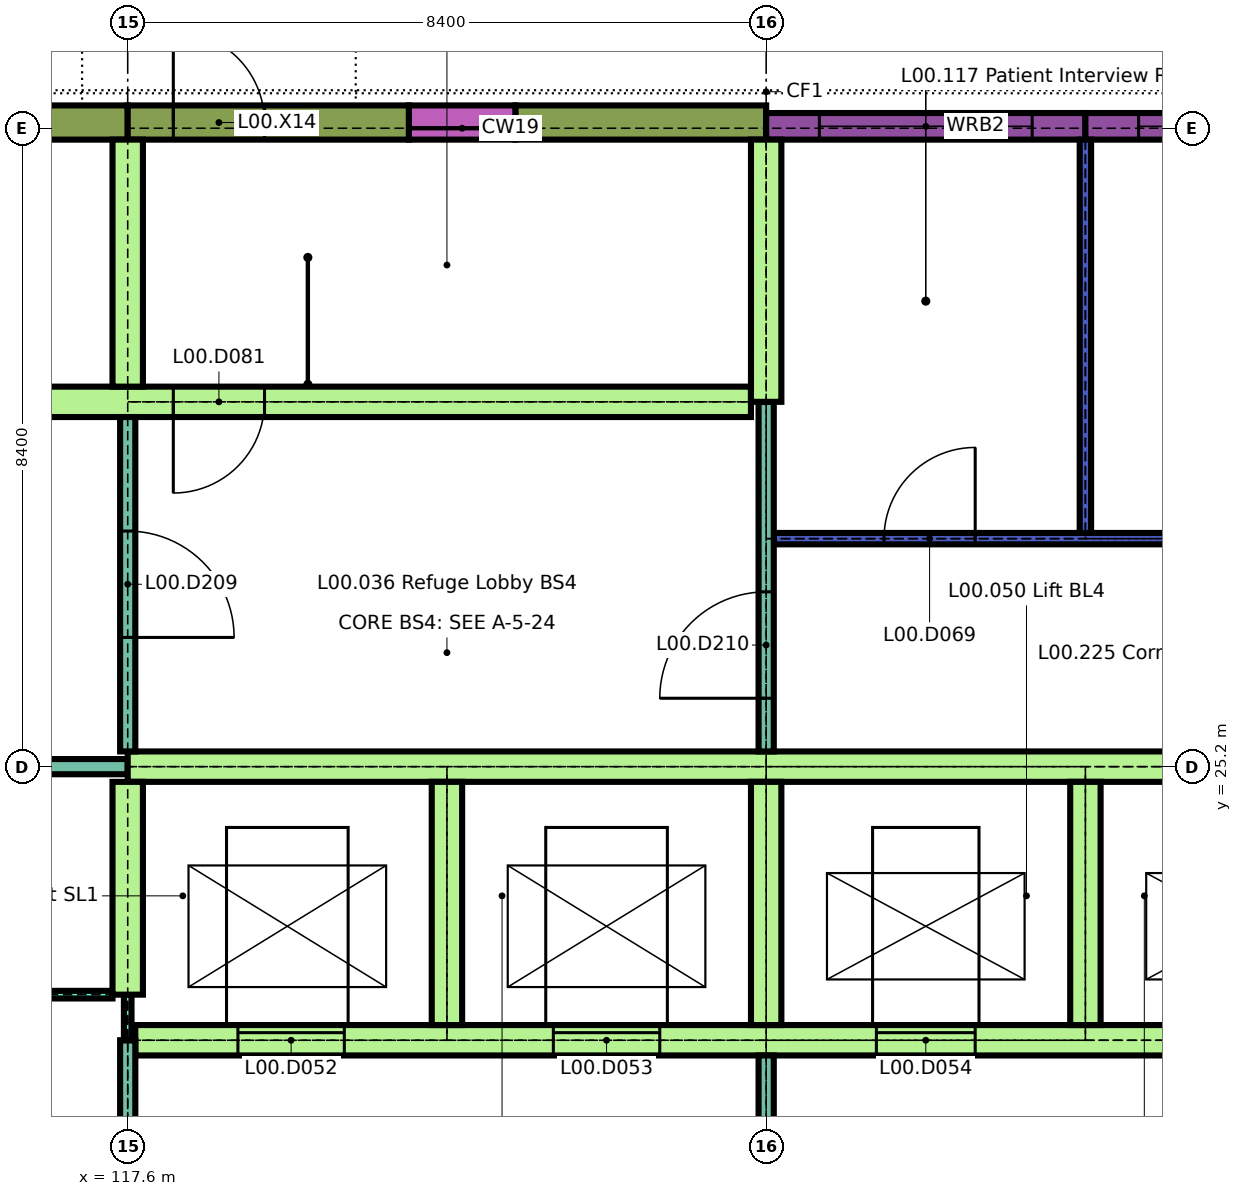
"""IFC4 building model, lengths in metres.
Left out: names, types, materials, properties, quantities, classifications, styles, units other than length and angle.
Written with IfcOpenShell. Run it as: python <this file> out.ifc"""

import sys

from ifc_helpers import new_model, si_unit, direction, frame, frame_2d, origin, place, context, subcontext, project, spatial, rectangle, extrude, element, fill, save


model = new_model("IFC4")
c1 = context("Model", 3, precision=1e-05, world=origin(), true_north=direction((0.0, 1.0)))
c2 = subcontext(c1, "Body", "Model", "MODEL_VIEW")
j1 = project(units=[si_unit("LENGTHUNIT", "METRE"), si_unit("PLANEANGLEUNIT", "RADIAN")], contexts=[c1])
p1 = place(None, origin())
s1 = spatial("IfcSite", under=j1, at=p1, CompositionType="ELEMENT")
p2 = place(p1, origin())
s2 = spatial("IfcBuilding", under=s1, at=p2, CompositionType="ELEMENT")
p3 = place(p2, origin())
s3 = spatial("IfcBuildingStorey", under=s2, at=p3, CompositionType="ELEMENT", Elevation=0.0)
p4 = place(p3, frame((114.3, 33.675, 0.0), z_axis=(0.0, 0.0, 1.0), x_axis=(1.0, 0.0, 0.0)))
e1 = element("IfcWall", 1, at=p4, inside=s3, PredefinedType="SOLIDWALL", context=c2, shape_type="SweptSolid", body=[
    extrude(rectangle(XDim=3.3, YDim=0.45, at=frame_2d((1.65, 0.0))), origin(), (0.0, 0.0, 1.0), 4.14),
])
p5 = place(p3, frame((117.6, 33.675, 0.0), z_axis=(0.0, 0.0, 1.0), x_axis=(1.0, 0.0, 0.0)))
e2 = element("IfcWall", 2, at=p5, inside=s3, PredefinedType="SOLIDWALL", context=c2, shape_type="SweptSolid", body=[
    extrude(rectangle(XDim=3.7, YDim=0.45, at=frame_2d((1.85, 0.0))), origin(), (0.0, 0.0, 1.0), 4.14),
])
p6 = place(p5, frame((0.6, 0.0, 0.0)))
e3 = element("IfcOpeningElement", 3, at=p6, cuts=e2, PredefinedType="OPENING", context=c2, shape_type="SweptSolid", body=[
    extrude(rectangle(XDim=1.2, YDim=2.1, at=frame_2d((0.6, 1.05))), frame((0.0, 0.235, 0.0), z_axis=(0.0, -1.0, 0.0), x_axis=(1.0, 0.0, 0.0)), (0.0, 0.0, 1.0), 0.47),
])
p7 = place(p3, frame((122.7, 33.675, 0.0), z_axis=(0.0, 0.0, 1.0), x_axis=(1.0, 0.0, 0.0)))
e4 = element("IfcWall", 4, at=p7, inside=s3, PredefinedType="SOLIDWALL", context=c2, shape_type="SweptSolid", body=[
    extrude(rectangle(XDim=3.3, YDim=0.45, at=frame_2d((1.65, 0.0))), origin(), (0.0, 0.0, 1.0), 4.14),
])
p8 = place(p3, frame((121.3, 33.675, 0.0), z_axis=(0.0, 0.0, 1.0), x_axis=(1.0, 0.0, 0.0)))
e5 = element("IfcWall", 5, at=p8, inside=s3, PredefinedType="SOLIDWALL", context=c2, shape_type="SweptSolid", body=[
    extrude(rectangle(XDim=1.4, YDim=0.45, at=frame_2d((0.7, 0.0))), origin(), (0.0, 0.0, 1.0), 0.6),
])
p9 = place(p3, frame((126.0, 33.625, 0.0), z_axis=(0.0, 0.0, 1.0), x_axis=(1.0, 0.0, 0.0)))
e6 = element("IfcWall", 6, at=p9, inside=s3, PredefinedType="SOLIDWALL", context=c2, shape_type="SweptSolid", body=[
    extrude(rectangle(XDim=4.2, YDim=0.35, at=frame_2d((2.1, 0.0))), origin(), (0.0, 0.0, 1.0), 3.84),
])
p10 = place(p9, frame((0.7, 0.0, 1.0)))
e7 = element("IfcOpeningElement", 7, at=p10, cuts=e6, PredefinedType="OPENING", context=c2, shape_type="SweptSolid", body=[
    extrude(rectangle(XDim=2.8, YDim=1.5, at=frame_2d((1.4, 0.75))), frame((0.0, 0.185, 0.0), z_axis=(0.0, -1.0, 0.0), x_axis=(1.0, 0.0, 0.0)), (0.0, 0.0, 1.0), 0.37),
])
p11 = place(p3, frame((130.2, 33.625, 0.0), z_axis=(0.0, 0.0, 1.0), x_axis=(1.0, 0.0, 0.0)))
e8 = element("IfcWall", 8, at=p11, inside=s3, PredefinedType="SOLIDWALL", context=c2, shape_type="SweptSolid", body=[
    extrude(rectangle(XDim=3.775, YDim=0.35, at=frame_2d((1.888, 0.0))), origin(), (0.0, 0.0, 1.0), 3.84),
])
p12 = place(p11, frame((0.7, 0.0, 1.0)))
e9 = element("IfcOpeningElement", 9, at=p12, cuts=e8, PredefinedType="OPENING", context=c2, shape_type="SweptSolid", body=[
    extrude(rectangle(XDim=2.8, YDim=1.5, at=frame_2d((1.4, 0.75))), frame((0.0, 0.185, 0.0), z_axis=(0.0, -1.0, 0.0), x_axis=(1.0, 0.0, 0.0)), (0.0, 0.0, 1.0), 0.37),
])
p13 = place(p3, frame((117.7, 21.6, 0.0), z_axis=(0.0, 0.0, 1.0), x_axis=(1.0, 0.0, 0.0)))
e10 = element("IfcWall", 10, at=p13, inside=s3, PredefinedType="SHEAR", context=c2, shape_type="SweptSolid", body=[
    extrude(rectangle(XDim=24.988, YDim=0.4, at=frame_2d((12.494, 0.0))), origin(), (0.0, 0.0, 1.0), 4.14),
])
p14 = place(p13, frame((1.35, 0.0, 0.0)))
e11 = element("IfcOpeningElement", 11, at=p14, cuts=e10, PredefinedType="OPENING", context=c2, shape_type="SweptSolid", body=[
    extrude(rectangle(XDim=1.4, YDim=2.1, at=frame_2d((0.7, 1.05))), frame((0.0, 0.21, 0.0), z_axis=(0.0, -1.0, 0.0), x_axis=(1.0, 0.0, 0.0)), (0.0, 0.0, 1.0), 0.42),
])
p15 = place(p13, frame((5.5, 0.0, 0.0)))
e12 = element("IfcOpeningElement", 12, at=p15, cuts=e10, PredefinedType="OPENING", context=c2, shape_type="SweptSolid", body=[
    extrude(rectangle(XDim=1.4, YDim=2.1, at=frame_2d((0.7, 1.05))), frame((0.0, 0.21, 0.0), z_axis=(0.0, -1.0, 0.0), x_axis=(1.0, 0.0, 0.0)), (0.0, 0.0, 1.0), 0.42),
])
p16 = place(p13, frame((9.75, 0.0, 0.0)))
e13 = element("IfcOpeningElement", 13, at=p16, cuts=e10, PredefinedType="OPENING", context=c2, shape_type="SweptSolid", body=[
    extrude(rectangle(XDim=1.3, YDim=2.1, at=frame_2d((0.65, 1.05))), frame((0.0, 0.21, 0.0), z_axis=(0.0, -1.0, 0.0), x_axis=(1.0, 0.0, 0.0)), (0.0, 0.0, 1.0), 0.42),
])
p17 = place(p13, frame((13.95, 0.0, 0.0)))
e14 = element("IfcOpeningElement", 14, at=p17, cuts=e10, PredefinedType="OPENING", context=c2, shape_type="SweptSolid", body=[
    extrude(rectangle(XDim=1.3, YDim=2.1, at=frame_2d((0.65, 1.05))), frame((0.0, 0.21, 0.0), z_axis=(0.0, -1.0, 0.0), x_axis=(1.0, 0.0, 0.0)), (0.0, 0.0, 1.0), 0.42),
])
p18 = place(p13, frame((18.25, 0.0, 0.0)))
e15 = element("IfcOpeningElement", 15, at=p18, cuts=e10, PredefinedType="OPENING", context=c2, shape_type="SweptSolid", body=[
    extrude(rectangle(XDim=1.1, YDim=2.1, at=frame_2d((0.55, 1.05))), frame((0.0, 0.21, 0.0), z_axis=(0.0, -1.0, 0.0), x_axis=(1.0, 0.0, 0.0)), (0.0, 0.0, 1.0), 0.42),
])
p19 = place(p13, frame((22.394, 0.0, 0.0)))
e16 = element("IfcOpeningElement", 16, at=p19, cuts=e10, PredefinedType="OPENING", context=c2, shape_type="SweptSolid", body=[
    extrude(rectangle(XDim=1.1, YDim=2.1, at=frame_2d((0.55, 1.05))), frame((0.0, 0.21, 0.0), z_axis=(0.0, -1.0, 0.0), x_axis=(1.0, 0.0, 0.0)), (0.0, 0.0, 1.0), 0.42),
])
p20 = place(p3, frame((100.875, 22.2, 0.0), z_axis=(0.0, 0.0, 1.0), x_axis=(1.0, 0.0, 0.0)))
e17 = element("IfcWall", 17, at=p20, inside=s3, PredefinedType="PARTITIONING", context=c2, shape_type="SweptSolid", body=[
    extrude(rectangle(XDim=16.525, YDim=0.1, at=frame_2d((8.262, 0.0))), origin(), (0.0, 0.0, 1.0), 4.14),
])
p21 = place(p3, frame((105.0, 25.2, 0.0), z_axis=(0.0, 0.0, 1.0), x_axis=(1.0, 0.0, 0.0)))
e18 = element("IfcWall", 18, at=p21, inside=s3, PredefinedType="PARTITIONING", context=c2, shape_type="SweptSolid", body=[
    extrude(rectangle(XDim=12.6, YDim=0.2, at=frame_2d((6.3, 0.0))), origin(), (0.0, 0.0, 1.0), 4.14),
])
p22 = place(p21, frame((1.1, 0.0, 0.0)))
e19 = element("IfcOpeningElement", 19, at=p22, cuts=e18, PredefinedType="OPENING", context=c2, shape_type="SweptSolid", body=[
    extrude(rectangle(XDim=2.0, YDim=2.4, at=frame_2d((1.0, 1.2))), frame((0.0, 0.11, 0.0), z_axis=(0.0, -1.0, 0.0), x_axis=(1.0, 0.0, 0.0)), (0.0, 0.0, 1.0), 0.22),
])
p23 = place(p21, frame((7.7, 0.0, 0.0)))
e20 = element("IfcOpeningElement", 20, at=p23, cuts=e18, PredefinedType="OPENING", context=c2, shape_type="SweptSolid", body=[
    extrude(rectangle(XDim=1.4, YDim=2.1, at=frame_2d((0.7, 1.05))), frame((0.0, 0.11, 0.0), z_axis=(0.0, -1.0, 0.0), x_axis=(1.0, 0.0, 0.0)), (0.0, 0.0, 1.0), 0.22),
])
p24 = place(p3, frame((117.6, 25.2, 0.0), z_axis=(0.0, 0.0, 1.0), x_axis=(1.0, 0.0, 0.0)))
e21 = element("IfcWall", 21, at=p24, inside=s3, PredefinedType="SHEAR", context=c2, shape_type="SweptSolid", body=[
    extrude(rectangle(XDim=25.2, YDim=0.4, at=frame_2d((12.6, 0.0))), origin(), (0.0, 0.0, 1.0), 4.14),
])
p25 = place(p3, frame((126.1, 28.2, 0.0), z_axis=(0.0, 0.0, 1.0), x_axis=(1.0, 0.0, 0.0)))
e22 = element("IfcWall", 22, at=p25, inside=s3, PredefinedType="PARTITIONING", context=c2, shape_type="SweptSolid", body=[
    extrude(rectangle(XDim=12.4, YDim=0.15, at=frame_2d((6.2, 0.0))), origin(), (0.0, 0.0, 1.0), 4.14),
])
p26 = place(p25, frame((1.45, 0.0, 0.0)))
e23 = element("IfcOpeningElement", 23, at=p26, cuts=e22, PredefinedType="OPENING", context=c2, shape_type="SweptSolid", body=[
    extrude(rectangle(XDim=1.2, YDim=2.1, at=frame_2d((0.6, 1.05))), frame((0.0, 0.085, 0.0), z_axis=(0.0, -1.0, 0.0), x_axis=(1.0, 0.0, 0.0)), (0.0, 0.0, 1.0), 0.17),
])
p27 = place(p25, frame((7.65, 0.0, 0.0)))
e24 = element("IfcOpeningElement", 24, at=p27, cuts=e22, PredefinedType="OPENING", context=c2, shape_type="SweptSolid", body=[
    extrude(rectangle(XDim=1.2, YDim=2.1, at=frame_2d((0.6, 1.05))), frame((0.0, 0.085, 0.0), z_axis=(0.0, -1.0, 0.0), x_axis=(1.0, 0.0, 0.0)), (0.0, 0.0, 1.0), 0.17),
])
p28 = place(p3, frame((105.2, 30.0, 0.0), z_axis=(0.0, 0.0, 1.0), x_axis=(1.0, 0.0, 0.0)))
e25 = element("IfcWall", 25, at=p28, inside=s3, PredefinedType="SHEAR", context=c2, shape_type="SweptSolid", body=[
    extrude(rectangle(XDim=20.6, YDim=0.4, at=frame_2d((10.3, 0.0))), origin(), (0.0, 0.0, 1.0), 4.14),
])
p29 = place(p28, frame((1.35, 0.0, 0.0)))
e26 = element("IfcOpeningElement", 26, at=p29, cuts=e25, PredefinedType="OPENING", context=c2, shape_type="SweptSolid", body=[
    extrude(rectangle(XDim=1.3, YDim=2.1, at=frame_2d((0.65, 1.05))), frame((0.0, 0.21, 0.0), z_axis=(0.0, -1.0, 0.0), x_axis=(1.0, 0.0, 0.0)), (0.0, 0.0, 1.0), 0.42),
])
p30 = place(p28, frame((4.6, 0.0, 0.0)))
e27 = element("IfcOpeningElement", 27, at=p30, cuts=e25, PredefinedType="OPENING", context=c2, shape_type="SweptSolid", body=[
    extrude(rectangle(XDim=1.2, YDim=2.1, at=frame_2d((0.6, 1.05))), frame((0.0, 0.21, 0.0), z_axis=(0.0, -1.0, 0.0), x_axis=(1.0, 0.0, 0.0)), (0.0, 0.0, 1.0), 0.42),
])
p31 = place(p28, frame((13.0, 0.0, 0.0)))
e28 = element("IfcOpeningElement", 28, at=p31, cuts=e25, PredefinedType="OPENING", context=c2, shape_type="SweptSolid", body=[
    extrude(rectangle(XDim=1.2, YDim=2.1, at=frame_2d((0.6, 1.05))), frame((0.0, 0.21, 0.0), z_axis=(0.0, -1.0, 0.0), x_axis=(1.0, 0.0, 0.0)), (0.0, 0.0, 1.0), 0.42),
])
p32 = place(p3, frame((117.6, 16.9, 0.0), z_axis=(0.0, 0.0, 1.0), x_axis=(0.0, 1.0, 0.0)))
e29 = element("IfcWall", 29, at=p32, inside=s3, PredefinedType="PARTITIONING", context=c2, shape_type="SweptSolid", body=[
    extrude(rectangle(XDim=4.7, YDim=0.2, at=frame_2d((2.35, 0.0))), origin(), (0.0, 0.0, 1.0), 4.14),
])
p33 = place(p3, frame((117.6, 21.6, 0.0), z_axis=(0.0, 0.0, 1.0), x_axis=(0.0, 1.0, 0.0)))
e30 = element("IfcWall", 30, at=p33, inside=s3, PredefinedType="PARTITIONING", context=c2, shape_type="SweptSolid", body=[
    extrude(rectangle(XDim=0.6, YDim=0.1, at=frame_2d((0.3, 0.0))), origin(), (0.0, 0.0, 1.0), 4.14),
])
p34 = place(p3, frame((117.6, 22.2, 0.0), z_axis=(0.0, 0.0, 1.0), x_axis=(0.0, 1.0, 0.0)))
e31 = element("IfcWall", 31, at=p34, inside=s3, PredefinedType="SHEAR", context=c2, shape_type="SweptSolid", body=[
    extrude(rectangle(XDim=2.8, YDim=0.4, at=frame_2d((1.4, 0.0))), origin(), (0.0, 0.0, 1.0), 4.14),
])
p35 = place(p3, frame((117.6, 25.4, 0.0), z_axis=(0.0, 0.0, 1.0), x_axis=(0.0, 1.0, 0.0)))
e32 = element("IfcWall", 32, at=p35, inside=s3, PredefinedType="PARTITIONING", context=c2, shape_type="SweptSolid", body=[
    extrude(rectangle(XDim=4.4, YDim=0.2, at=frame_2d((2.2, 0.0))), origin(), (0.0, 0.0, 1.0), 4.14),
])
p36 = place(p35, frame((1.5, 0.0, 0.0)))
e33 = element("IfcOpeningElement", 33, at=p36, cuts=e32, PredefinedType="OPENING", context=c2, shape_type="SweptSolid", body=[
    extrude(rectangle(XDim=1.4, YDim=2.1, at=frame_2d((0.7, 1.05))), frame((0.0, 0.11, 0.0), z_axis=(0.0, -1.0, 0.0), x_axis=(1.0, 0.0, 0.0)), (0.0, 0.0, 1.0), 0.22),
])
p37 = place(p3, frame((117.6, 30.2, 0.0), z_axis=(0.0, 0.0, 1.0), x_axis=(0.0, 1.0, 0.0)))
e34 = element("IfcWall", 34, at=p37, inside=s3, PredefinedType="SHEAR", context=c2, shape_type="SweptSolid", body=[
    extrude(rectangle(XDim=3.25, YDim=0.4, at=frame_2d((1.625, 0.0))), origin(), (0.0, 0.0, 1.0), 4.14),
])
p38 = place(p3, frame((121.8, 21.8, 0.0), z_axis=(0.0, 0.0, 1.0), x_axis=(0.0, 1.0, 0.0)))
e35 = element("IfcWall", 35, at=p38, inside=s3, PredefinedType="SHEAR", context=c2, shape_type="SweptSolid", body=[
    extrude(rectangle(XDim=3.2, YDim=0.4, at=frame_2d((1.6, 0.0))), origin(), (0.0, 0.0, 1.0), 4.14),
])
p39 = place(p3, frame((126.0, 16.9, 0.0), z_axis=(0.0, 0.0, 1.0), x_axis=(0.0, 1.0, 0.0)))
e36 = element("IfcWall", 36, at=p39, inside=s3, PredefinedType="PARTITIONING", context=c2, shape_type="SweptSolid", body=[
    extrude(rectangle(XDim=4.5, YDim=0.2, at=frame_2d((2.25, 0.0))), origin(), (0.0, 0.0, 1.0), 4.14),
])
p40 = place(p3, frame((126.0, 21.8, 0.0), z_axis=(0.0, 0.0, 1.0), x_axis=(0.0, 1.0, 0.0)))
e37 = element("IfcWall", 37, at=p40, inside=s3, PredefinedType="SHEAR", context=c2, shape_type="SweptSolid", body=[
    extrude(rectangle(XDim=3.2, YDim=0.4, at=frame_2d((1.6, 0.0))), origin(), (0.0, 0.0, 1.0), 4.14),
])
p41 = place(p3, frame((126.0, 25.4, 0.0), z_axis=(0.0, 0.0, 1.0), x_axis=(0.0, 1.0, 0.0)))
e38 = element("IfcWall", 38, at=p41, inside=s3, PredefinedType="PARTITIONING", context=c2, shape_type="SweptSolid", body=[
    extrude(rectangle(XDim=4.6, YDim=0.2, at=frame_2d((2.3, 0.0))), origin(), (0.0, 0.0, 1.0), 4.14),
])
p42 = place(p41, frame((0.7, 0.0, 0.0)))
e39 = element("IfcOpeningElement", 39, at=p42, cuts=e38, PredefinedType="OPENING", context=c2, shape_type="SweptSolid", body=[
    extrude(rectangle(XDim=1.4, YDim=2.1, at=frame_2d((0.7, 1.05))), frame((0.0, 0.11, 0.0), z_axis=(0.0, -1.0, 0.0), x_axis=(1.0, 0.0, 0.0)), (0.0, 0.0, 1.0), 0.22),
])
p43 = place(p3, frame((126.0, 30.0, 0.0), z_axis=(0.0, 0.0, 1.0), x_axis=(0.0, 1.0, 0.0)))
e40 = element("IfcWall", 40, at=p43, inside=s3, PredefinedType="SHEAR", context=c2, shape_type="SweptSolid", body=[
    extrude(rectangle(XDim=3.45, YDim=0.4, at=frame_2d((1.725, 0.0))), origin(), (0.0, 0.0, 1.0), 4.14),
])
p44 = place(p3, frame((130.2, 21.8, 0.0), z_axis=(0.0, 0.0, 1.0), x_axis=(0.0, 1.0, 0.0)))
e41 = element("IfcWall", 41, at=p44, inside=s3, PredefinedType="SHEAR", context=c2, shape_type="SweptSolid", body=[
    extrude(rectangle(XDim=3.2, YDim=0.4, at=frame_2d((1.6, 0.0))), origin(), (0.0, 0.0, 1.0), 4.14),
])
p45 = place(p3, frame((130.2, 28.275, 0.0), z_axis=(0.0, 0.0, 1.0), x_axis=(0.0, 1.0, 0.0)))
e42 = element("IfcWall", 42, at=p45, inside=s3, PredefinedType="PARTITIONING", context=c2, shape_type="SweptSolid", body=[
    extrude(rectangle(XDim=5.175, YDim=0.15, at=frame_2d((2.587, 0.0))), origin(), (0.0, 0.0, 1.0), 4.14),
])
p46 = place(p6, origin())
e43 = element("IfcDoor", 43, at=p46, inside=s3, OperationType="SINGLE_SWING_RIGHT", PredefinedType="DOOR", context=c2, shape_type="SweptSolid", body=[
    extrude(rectangle(XDim=1.2, YDim=2.1, at=frame_2d((0.6, 1.05))), frame((0.0, 0.025, 0.0), z_axis=(0.0, -1.0, 0.0), x_axis=(1.0, 0.0, 0.0)), (0.0, 0.0, 1.0), 0.05),
])
fill(e3, e43)
p47 = place(p10, origin())
e44 = element("IfcWindow", 44, at=p47, inside=s3, PartitioningType="DOUBLE_PANEL_VERTICAL", PredefinedType="WINDOW", context=c2, shape_type="SweptSolid", body=[
    extrude(rectangle(XDim=2.8, YDim=1.5, at=frame_2d((1.4, 0.75))), frame((0.0, 0.03, 0.0), z_axis=(0.0, -1.0, 0.0), x_axis=(1.0, 0.0, 0.0)), (0.0, 0.0, 1.0), 0.06),
])
fill(e7, e44)
p48 = place(p12, origin())
e45 = element("IfcWindow", 45, at=p48, inside=s3, PartitioningType="DOUBLE_PANEL_VERTICAL", PredefinedType="WINDOW", context=c2, shape_type="SweptSolid", body=[
    extrude(rectangle(XDim=2.8, YDim=1.5, at=frame_2d((1.4, 0.75))), frame((0.0, 0.03, 0.0), z_axis=(0.0, -1.0, 0.0), x_axis=(1.0, 0.0, 0.0)), (0.0, 0.0, 1.0), 0.06),
])
fill(e9, e45)
p49 = place(p14, origin())
e46 = element("IfcDoor", 46, at=p49, inside=s3, OperationType="SLIDING_TO_LEFT", PredefinedType="DOOR", context=c2, shape_type="SweptSolid", body=[
    extrude(rectangle(XDim=1.4, YDim=2.1, at=frame_2d((0.7, 1.05))), frame((0.0, 0.025, 0.0), z_axis=(0.0, -1.0, 0.0), x_axis=(1.0, 0.0, 0.0)), (0.0, 0.0, 1.0), 0.05),
])
fill(e11, e46)
p50 = place(p15, origin())
e47 = element("IfcDoor", 47, at=p50, inside=s3, OperationType="SLIDING_TO_LEFT", PredefinedType="DOOR", context=c2, shape_type="SweptSolid", body=[
    extrude(rectangle(XDim=1.4, YDim=2.1, at=frame_2d((0.7, 1.05))), frame((0.0, 0.025, 0.0), z_axis=(0.0, -1.0, 0.0), x_axis=(1.0, 0.0, 0.0)), (0.0, 0.0, 1.0), 0.05),
])
fill(e12, e47)
p51 = place(p16, origin())
e48 = element("IfcDoor", 48, at=p51, inside=s3, OperationType="SLIDING_TO_LEFT", PredefinedType="DOOR", context=c2, shape_type="SweptSolid", body=[
    extrude(rectangle(XDim=1.3, YDim=2.1, at=frame_2d((0.65, 1.05))), frame((0.0, 0.025, 0.0), z_axis=(0.0, -1.0, 0.0), x_axis=(1.0, 0.0, 0.0)), (0.0, 0.0, 1.0), 0.05),
])
fill(e13, e48)
p52 = place(p26, origin())
e49 = element("IfcDoor", 49, at=p52, inside=s3, OperationType="SINGLE_SWING_LEFT", PredefinedType="DOOR", context=c2, shape_type="SweptSolid", body=[
    extrude(rectangle(XDim=1.2, YDim=2.1, at=frame_2d((0.6, 1.05))), frame((0.0, 0.025, 0.0), z_axis=(0.0, -1.0, 0.0), x_axis=(1.0, 0.0, 0.0)), (0.0, 0.0, 1.0), 0.05),
])
fill(e23, e49)
p53 = place(p31, origin())
e50 = element("IfcDoor", 50, at=p53, inside=s3, OperationType="SINGLE_SWING_LEFT", PredefinedType="DOOR", context=c2, shape_type="SweptSolid", body=[
    extrude(rectangle(XDim=1.2, YDim=2.1, at=frame_2d((0.6, 1.05))), frame((0.0, 0.025, 0.0), z_axis=(0.0, -1.0, 0.0), x_axis=(1.0, 0.0, 0.0)), (0.0, 0.0, 1.0), 0.05),
])
fill(e28, e50)
p54 = place(p36, origin())
e51 = element("IfcDoor", 51, at=p54, inside=s3, OperationType="SINGLE_SWING_LEFT", PredefinedType="DOOR", context=c2, shape_type="SweptSolid", body=[
    extrude(rectangle(XDim=1.4, YDim=2.1, at=frame_2d((0.7, 1.05))), frame((0.0, 0.025, 0.0), z_axis=(0.0, -1.0, 0.0), x_axis=(1.0, 0.0, 0.0)), (0.0, 0.0, 1.0), 0.05),
])
fill(e33, e51)
p55 = place(p42, origin())
e52 = element("IfcDoor", 52, at=p55, inside=s3, OperationType="SINGLE_SWING_RIGHT", PredefinedType="DOOR", context=c2, shape_type="SweptSolid", body=[
    extrude(rectangle(XDim=1.4, YDim=2.1, at=frame_2d((0.7, 1.05))), frame((0.0, 0.03, 0.0), z_axis=(0.0, -1.0, 0.0), x_axis=(1.0, 0.0, 0.0)), (0.0, 0.0, 1.0), 0.06),
])
fill(e39, e52)
save(model, sys.argv[1])
